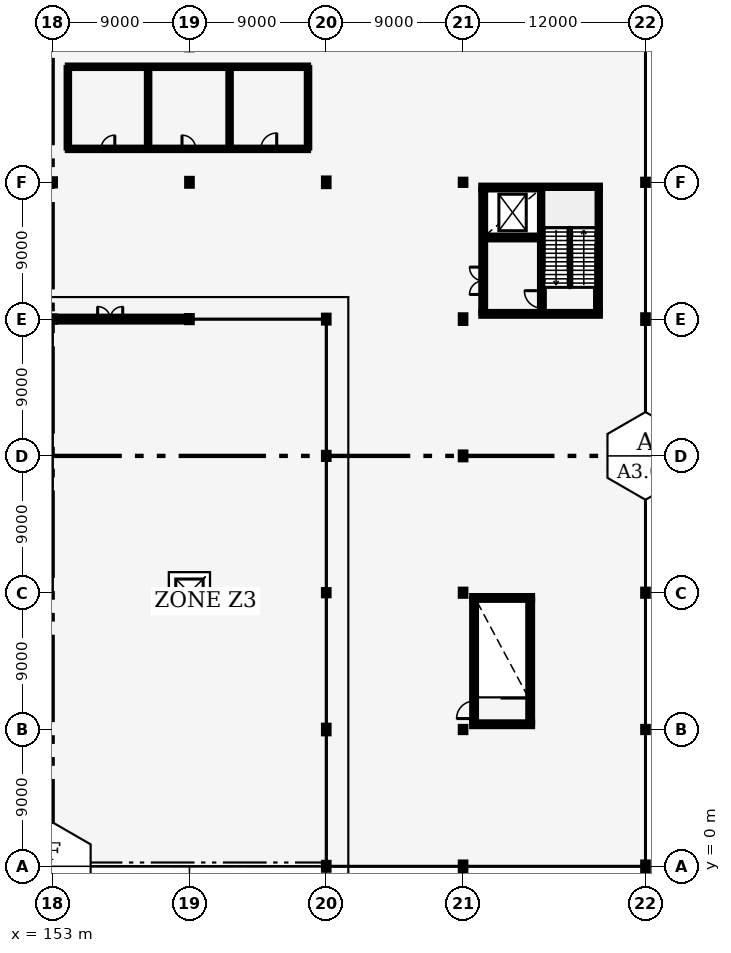
"""IFC4 building model, lengths in metres.
Left out: names, types, materials, properties, quantities, classifications, styles, units other than length and angle.
Written with IfcOpenShell. Run it as: python <this file> out.ifc"""

import sys

from ifc_helpers import new_model, si_unit, direction, frame, frame_2d, origin, origin_2d, place, context, subcontext, project, spatial, rectangle, i_section, extrude, element, fill, save


model = new_model("IFC4")
c1 = context("Model", 3, precision=1e-05, world=origin(), true_north=direction((0.0, 1.0)))
c2 = subcontext(c1, "Body", "Model", "MODEL_VIEW")
j1 = project(units=[si_unit("LENGTHUNIT", "METRE"), si_unit("PLANEANGLEUNIT", "RADIAN")], contexts=[c1])
p1 = place(None, origin())
s1 = spatial("IfcSite", under=j1, at=p1, CompositionType="ELEMENT")
p2 = place(p1, origin())
s2 = spatial("IfcBuilding", under=s1, at=p2, CompositionType="ELEMENT")
p3 = place(p2, frame((0.0, 0.0, 18.0)))
s3 = spatial("IfcBuildingStorey", under=s2, at=p3, CompositionType="ELEMENT", Elevation=18.0)
p4 = place(p3, frame((153.0, 36.0, 0.0), z_axis=(0.0, 0.0, 1.0), x_axis=(1.0, 0.0, 0.0)))
e1 = element("IfcColumn", 1, at=p4, inside=s3, PredefinedType="COLUMN", context=c2, shape_type="SweptSolid", body=[
    extrude(i_section(OverallWidth=0.3, OverallDepth=0.34, WebThickness=0.012, FlangeThickness=0.021, FilletRadius=0.027, at=origin_2d()), origin(), (0.0, 0.0, 1.0), 4.8),
])
for number, where, z_axis, x_axis in (
    (2, (153.0, 45.0, 0.0), (0.0, 0.0, 1.0), (1.0, 0.0, 0.0)),
    (3, (162.0, 36.0, 0.0), (0.0, 0.0, 1.0), (1.0, 0.0, 0.0)),
):
    element("IfcColumn", number, at=place(p3, frame(where, z_axis=z_axis, x_axis=x_axis)), inside=s3, PredefinedType="COLUMN", context=c2, shape_type="SweptSolid", body=[
        extrude(i_section(OverallWidth=0.3, OverallDepth=0.4, WebThickness=0.013, FlangeThickness=0.024, FilletRadius=0.027, at=origin_2d()), origin(), (0.0, 0.0, 1.0), 4.8),
    ])
for number, where, z_axis, x_axis in (
    (4, (162.0, 45.0, 0.0), (0.0, 0.0, 1.0), (1.0, 0.0, 0.0)),
    (5, (171.0, 0.0, 0.0), (0.0, 0.0, 1.0), (1.0, 0.0, 0.0)),
):
    element("IfcColumn", number, at=place(p3, frame(where, z_axis=z_axis, x_axis=x_axis)), inside=s3, PredefinedType="COLUMN", context=c2, shape_type="SweptSolid", body=[
        extrude(i_section(OverallWidth=0.3, OverallDepth=0.45, WebThickness=0.014, FlangeThickness=0.026, FilletRadius=0.027, at=origin_2d()), origin(), (0.0, 0.0, 1.0), 4.8),
    ])
p5 = place(p3, frame((171.0, 9.0, 0.0), z_axis=(0.0, 0.0, 1.0), x_axis=(1.0, 0.0, 0.0)))
e6 = element("IfcColumn", 6, at=p5, inside=s3, PredefinedType="COLUMN", context=c2, shape_type="SweptSolid", body=[
    extrude(i_section(OverallWidth=0.3, OverallDepth=0.5, WebThickness=0.014, FlangeThickness=0.028, FilletRadius=0.027, at=origin_2d()), origin(), (0.0, 0.0, 1.0), 4.8),
])
p6 = place(p3, frame((171.0, 18.0, 0.0), z_axis=(0.0, 0.0, 1.0), x_axis=(1.0, 0.0, 0.0)))
e7 = element("IfcColumn", 7, at=p6, inside=s3, PredefinedType="COLUMN", context=c2, shape_type="SweptSolid", body=[
    extrude(i_section(OverallWidth=0.3, OverallDepth=0.34, WebThickness=0.012, FlangeThickness=0.021, FilletRadius=0.027, at=origin_2d()), origin(), (0.0, 0.0, 1.0), 4.8),
])
p7 = place(p3, frame((171.0, 27.0, 0.0), z_axis=(0.0, 0.0, 1.0), x_axis=(1.0, 0.0, 0.0)))
e8 = element("IfcColumn", 8, at=p7, inside=s3, PredefinedType="COLUMN", context=c2, shape_type="SweptSolid", body=[
    extrude(i_section(OverallWidth=0.3, OverallDepth=0.4, WebThickness=0.013, FlangeThickness=0.024, FilletRadius=0.027, at=origin_2d()), origin(), (0.0, 0.0, 1.0), 4.8),
])
p8 = place(p3, frame((171.0, 36.0, 0.0), z_axis=(0.0, 0.0, 1.0), x_axis=(1.0, 0.0, 0.0)))
e9 = element("IfcColumn", 9, at=p8, inside=s3, PredefinedType="COLUMN", context=c2, shape_type="SweptSolid", body=[
    extrude(i_section(OverallWidth=0.3, OverallDepth=0.45, WebThickness=0.014, FlangeThickness=0.026, FilletRadius=0.027, at=origin_2d()), origin(), (0.0, 0.0, 1.0), 4.8),
])
for number, where, z_axis, x_axis in (
    (10, (171.0, 45.0, 0.0), (0.0, 0.0, 1.0), (1.0, 0.0, 0.0)),
    (11, (180.0, 0.0, 0.0), (0.0, 0.0, 1.0), (1.0, 0.0, 0.0)),
):
    element("IfcColumn", number, at=place(p3, frame(where, z_axis=z_axis, x_axis=x_axis)), inside=s3, PredefinedType="COLUMN", context=c2, shape_type="SweptSolid", body=[
        extrude(i_section(OverallWidth=0.3, OverallDepth=0.5, WebThickness=0.014, FlangeThickness=0.028, FilletRadius=0.027, at=origin_2d()), origin(), (0.0, 0.0, 1.0), 4.8),
    ])
p9 = place(p3, frame((180.0, 9.0, 0.0), z_axis=(0.0, 0.0, 1.0), x_axis=(1.0, 0.0, 0.0)))
e12 = element("IfcColumn", 12, at=p9, inside=s3, PredefinedType="COLUMN", context=c2, shape_type="SweptSolid", body=[
    extrude(i_section(OverallWidth=0.3, OverallDepth=0.34, WebThickness=0.012, FlangeThickness=0.021, FilletRadius=0.027, at=origin_2d()), origin(), (0.0, 0.0, 1.0), 4.8),
])
p10 = place(p3, frame((180.0, 18.0, 0.0), z_axis=(0.0, 0.0, 1.0), x_axis=(1.0, 0.0, 0.0)))
e13 = element("IfcColumn", 13, at=p10, inside=s3, PredefinedType="COLUMN", context=c2, shape_type="SweptSolid", body=[
    extrude(i_section(OverallWidth=0.3, OverallDepth=0.4, WebThickness=0.013, FlangeThickness=0.024, FilletRadius=0.027, at=origin_2d()), origin(), (0.0, 0.0, 1.0), 4.8),
])
p11 = place(p3, frame((180.0, 27.0, 0.0), z_axis=(0.0, 0.0, 1.0), x_axis=(1.0, 0.0, 0.0)))
e14 = element("IfcColumn", 14, at=p11, inside=s3, PredefinedType="COLUMN", context=c2, shape_type="SweptSolid", body=[
    extrude(i_section(OverallWidth=0.3, OverallDepth=0.45, WebThickness=0.014, FlangeThickness=0.026, FilletRadius=0.027, at=origin_2d()), origin(), (0.0, 0.0, 1.0), 4.8),
])
p12 = place(p3, frame((180.0, 36.0, 0.0), z_axis=(0.0, 0.0, 1.0), x_axis=(1.0, 0.0, 0.0)))
e15 = element("IfcColumn", 15, at=p12, inside=s3, PredefinedType="COLUMN", context=c2, shape_type="SweptSolid", body=[
    extrude(i_section(OverallWidth=0.3, OverallDepth=0.5, WebThickness=0.014, FlangeThickness=0.028, FilletRadius=0.027, at=origin_2d()), origin(), (0.0, 0.0, 1.0), 4.8),
])
p13 = place(p3, frame((180.0, 45.0, 0.0), z_axis=(0.0, 0.0, 1.0), x_axis=(1.0, 0.0, 0.0)))
e16 = element("IfcColumn", 16, at=p13, inside=s3, PredefinedType="COLUMN", context=c2, shape_type="SweptSolid", body=[
    extrude(i_section(OverallWidth=0.3, OverallDepth=0.34, WebThickness=0.012, FlangeThickness=0.021, FilletRadius=0.027, at=origin_2d()), origin(), (0.0, 0.0, 1.0), 4.8),
])
p14 = place(p3, frame((192.0, 0.0, 0.0), z_axis=(0.0, 0.0, 1.0), x_axis=(1.0, 0.0, 0.0)))
e17 = element("IfcColumn", 17, at=p14, inside=s3, PredefinedType="COLUMN", context=c2, shape_type="SweptSolid", body=[
    extrude(i_section(OverallWidth=0.3, OverallDepth=0.5, WebThickness=0.014, FlangeThickness=0.028, FilletRadius=0.027, at=origin_2d()), origin(), (0.0, 0.0, 1.0), 4.8),
])
p15 = place(p3, frame((192.0, 9.0, 0.0), z_axis=(0.0, 0.0, 1.0), x_axis=(1.0, 0.0, 0.0)))
e18 = element("IfcColumn", 18, at=p15, inside=s3, PredefinedType="COLUMN", context=c2, shape_type="SweptSolid", body=[
    extrude(i_section(OverallWidth=0.3, OverallDepth=0.34, WebThickness=0.012, FlangeThickness=0.021, FilletRadius=0.027, at=origin_2d()), origin(), (0.0, 0.0, 1.0), 4.8),
])
p16 = place(p3, frame((192.0, 18.0, 0.0), z_axis=(0.0, 0.0, 1.0), x_axis=(1.0, 0.0, 0.0)))
e19 = element("IfcColumn", 19, at=p16, inside=s3, PredefinedType="COLUMN", context=c2, shape_type="SweptSolid", body=[
    extrude(i_section(OverallWidth=0.3, OverallDepth=0.4, WebThickness=0.013, FlangeThickness=0.024, FilletRadius=0.027, at=origin_2d()), origin(), (0.0, 0.0, 1.0), 4.8),
])
p17 = place(p3, frame((192.0, 27.0, 0.0), z_axis=(0.0, 0.0, 1.0), x_axis=(1.0, 0.0, 0.0)))
e20 = element("IfcColumn", 20, at=p17, inside=s3, PredefinedType="COLUMN", context=c2, shape_type="SweptSolid", body=[
    extrude(i_section(OverallWidth=0.3, OverallDepth=0.45, WebThickness=0.014, FlangeThickness=0.026, FilletRadius=0.027, at=origin_2d()), origin(), (0.0, 0.0, 1.0), 4.8),
])
p18 = place(p3, frame((192.0, 36.0, 0.0), z_axis=(0.0, 0.0, 1.0), x_axis=(1.0, 0.0, 0.0)))
e21 = element("IfcColumn", 21, at=p18, inside=s3, PredefinedType="COLUMN", context=c2, shape_type="SweptSolid", body=[
    extrude(i_section(OverallWidth=0.3, OverallDepth=0.5, WebThickness=0.014, FlangeThickness=0.028, FilletRadius=0.027, at=origin_2d()), origin(), (0.0, 0.0, 1.0), 4.8),
])
p19 = place(p3, frame((192.0, 45.0, 0.0), z_axis=(0.0, 0.0, 1.0), x_axis=(1.0, 0.0, 0.0)))
e22 = element("IfcColumn", 22, at=p19, inside=s3, PredefinedType="COLUMN", context=c2, shape_type="SweptSolid", body=[
    extrude(i_section(OverallWidth=0.3, OverallDepth=0.34, WebThickness=0.012, FlangeThickness=0.021, FilletRadius=0.027, at=origin_2d()), origin(), (0.0, 0.0, 1.0), 4.8),
])
p20 = place(p3, frame((153.145, 36.0, 0.0), z_axis=(0.0, 0.0, 1.0), x_axis=(1.0, 0.0, 0.0)))
e23 = element("IfcWall", 23, at=p20, inside=s3, PredefinedType="SOLIDWALL", context=c2, shape_type="SweptSolid", body=[
    extrude(rectangle(XDim=8.71, YDim=0.32, at=frame_2d((4.355, 0.0))), origin(), (0.0, 0.0, 1.0), 3.65),
])
p21 = place(p20, frame((2.815, 0.0, 0.0)))
e24 = element("IfcOpeningElement", 24, at=p21, cuts=e23, PredefinedType="OPENING", context=c2, shape_type="SweptSolid", body=[
    extrude(rectangle(XDim=1.65, YDim=2.25, at=frame_2d((0.825, 1.125))), frame((0.0, 0.17, 0.0), z_axis=(0.0, -1.0, 0.0), x_axis=(1.0, 0.0, 0.0)), (0.0, 0.0, 1.0), 0.34),
])
p22 = place(p20, frame((5.415, 0.0, 0.85)))
e25 = element("IfcOpeningElement", 25, at=p22, cuts=e23, PredefinedType="OPENING", context=c2, shape_type="SweptSolid", body=[
    extrude(rectangle(XDim=2.4, YDim=1.6, at=frame_2d((1.2, 0.8))), frame((0.0, 0.17, 0.0), z_axis=(0.0, -1.0, 0.0), x_axis=(1.0, 0.0, 0.0)), (0.0, 0.0, 1.0), 0.34),
])
p23 = place(p3, frame((181.325, 36.47, 0.0), z_axis=(0.0, 0.0, 1.0), x_axis=(0.0, 1.0, 0.0)))
e26 = element("IfcWall", 26, at=p23, inside=s3, PredefinedType="SHEAR", context=c2, shape_type="SweptSolid", body=[
    extrude(rectangle(XDim=8.06, YDim=0.25, at=frame_2d((4.03, 0.0))), origin(), (0.0, 0.0, 1.0), 4.45),
])
p24 = place(p23, frame((1.15, 0.0, 0.0)))
e27 = element("IfcOpeningElement", 27, at=p24, cuts=e26, PredefinedType="OPENING", context=c2, shape_type="SweptSolid", body=[
    extrude(rectangle(XDim=1.8, YDim=2.2, at=frame_2d((0.9, 1.1))), frame((0.0, 0.135, 0.0), z_axis=(0.0, -1.0, 0.0), x_axis=(1.0, 0.0, 0.0)), (0.0, 0.0, 1.0), 0.27),
])
p25 = place(p3, frame((188.875, 36.47, 0.0), z_axis=(0.0, 0.0, 1.0), x_axis=(0.0, 1.0, 0.0)))
e28 = element("IfcWall", 28, at=p25, inside=s3, PredefinedType="SHEAR", context=c2, shape_type="SweptSolid", body=[
    extrude(rectangle(XDim=8.06, YDim=0.25, at=frame_2d((4.03, 0.0))), origin(), (0.0, 0.0, 1.0), 4.45),
])
for number, where, z_axis, x_axis in (
    (29, (181.2, 36.345, 0.0), (0.0, 0.0, 1.0), (1.0, 0.0, 0.0)),
    (30, (181.2, 44.655, 0.0), (0.0, 0.0, 1.0), (1.0, 0.0, 0.0)),
):
    element("IfcWall", number, at=place(p3, frame(where, z_axis=z_axis, x_axis=x_axis)), inside=s3, PredefinedType="SHEAR", context=c2, shape_type="SweptSolid", body=[
        extrude(rectangle(XDim=7.8, YDim=0.25, at=frame_2d((3.9, 0.0))), origin(), (0.0, 0.0, 1.0), 4.45),
    ])
p26 = place(p3, frame((185.185, 36.47, 0.0), z_axis=(0.0, 0.0, 1.0), x_axis=(0.0, 1.0, 0.0)))
e31 = element("IfcWall", 31, at=p26, inside=s3, PredefinedType="SHEAR", context=c2, shape_type="SweptSolid", body=[
    extrude(rectangle(XDim=8.06, YDim=0.25, at=frame_2d((4.03, 0.0))), origin(), (0.0, 0.0, 1.0), 4.45),
])
p27 = place(p26, frame((0.25, 0.0, 0.0)))
e32 = element("IfcOpeningElement", 32, at=p27, cuts=e31, PredefinedType="OPENING", context=c2, shape_type="SweptSolid", body=[
    extrude(rectangle(XDim=1.15, YDim=2.15, at=frame_2d((0.575, 1.075))), frame((0.0, 0.135, 0.0), z_axis=(0.0, -1.0, 0.0), x_axis=(1.0, 0.0, 0.0)), (0.0, 0.0, 1.0), 0.27),
])
p28 = place(p3, frame((181.45, 41.37, 0.0), z_axis=(0.0, 0.0, 1.0), x_axis=(1.0, 0.0, 0.0)))
e33 = element("IfcWall", 33, at=p28, inside=s3, PredefinedType="SHEAR", context=c2, shape_type="SweptSolid", body=[
    extrude(rectangle(XDim=3.61, YDim=0.25, at=frame_2d((1.805, 0.0))), origin(), (0.0, 0.0, 1.0), 4.45),
])
p29 = place(p28, frame((0.95, 0.0, 0.0)))
e34 = element("IfcOpeningElement", 34, at=p29, cuts=e33, PredefinedType="OPENING", context=c2, shape_type="SweptSolid", body=[
    extrude(rectangle(XDim=1.2, YDim=2.2, at=frame_2d((0.6, 1.1))), frame((0.0, 0.135, 0.0), z_axis=(0.0, -1.0, 0.0), x_axis=(1.0, 0.0, 0.0)), (0.0, 0.0, 1.0), 0.27),
])
p30 = place(p3, frame((180.725, 9.47, 0.0), z_axis=(0.0, 0.0, 1.0), x_axis=(0.0, 1.0, 0.0)))
e35 = element("IfcWall", 35, at=p30, inside=s3, PredefinedType="SHEAR", context=c2, shape_type="SweptSolid", body=[
    extrude(rectangle(XDim=8.06, YDim=0.25, at=frame_2d((4.03, 0.0))), origin(), (0.0, 0.0, 1.0), 4.44),
])
p31 = place(p30, frame((0.25, 0.0, 0.0)))
e36 = element("IfcOpeningElement", 36, at=p31, cuts=e35, PredefinedType="OPENING", context=c2, shape_type="SweptSolid", body=[
    extrude(rectangle(XDim=1.15, YDim=2.15, at=frame_2d((0.575, 1.075))), frame((0.0, 0.135, 0.0), z_axis=(0.0, -1.0, 0.0), x_axis=(1.0, 0.0, 0.0)), (0.0, 0.0, 1.0), 0.27),
])
p32 = place(p3, frame((184.415, 9.47, 0.0), z_axis=(0.0, 0.0, 1.0), x_axis=(0.0, 1.0, 0.0)))
e37 = element("IfcWall", 37, at=p32, inside=s3, PredefinedType="SHEAR", context=c2, shape_type="SweptSolid", body=[
    extrude(rectangle(XDim=8.06, YDim=0.25, at=frame_2d((4.03, 0.0))), origin(), (0.0, 0.0, 1.0), 4.44),
])
for number, where, z_axis, x_axis in (
    (38, (180.6, 9.345, 0.0), (0.0, 0.0, 1.0), (1.0, 0.0, 0.0)),
    (39, (180.6, 17.655, 0.0), (0.0, 0.0, 1.0), (1.0, 0.0, 0.0)),
):
    element("IfcWall", number, at=place(p3, frame(where, z_axis=z_axis, x_axis=x_axis)), inside=s3, PredefinedType="SHEAR", context=c2, shape_type="SweptSolid", body=[
        extrude(rectangle(XDim=3.94, YDim=0.25, at=frame_2d((1.97, 0.0))), origin(), (0.0, 0.0, 1.0), 4.44),
    ])
p33 = place(p3, frame((154.0, 47.2, 0.0), z_axis=(0.0, 0.0, 1.0), x_axis=(1.0, 0.0, 0.0)))
e40 = element("IfcWall", 40, at=p33, inside=s3, PredefinedType="PLUMBINGWALL", context=c2, shape_type="SweptSolid", body=[
    extrude(rectangle(XDim=15.8, YDim=0.16, at=frame_2d((7.9, 0.0))), origin(), (0.0, 0.0, 1.0), 3.6),
])
p34 = place(p33, frame((2.19, 0.0, 0.0)))
e41 = element("IfcOpeningElement", 41, at=p34, cuts=e40, PredefinedType="OPENING", context=c2, shape_type="SweptSolid", body=[
    extrude(rectangle(XDim=0.9, YDim=2.1, at=frame_2d((0.45, 1.05))), frame((0.0, 0.09, 0.0), z_axis=(0.0, -1.0, 0.0), x_axis=(1.0, 0.0, 0.0)), (0.0, 0.0, 1.0), 0.18),
])
p35 = place(p33, frame((7.51, 0.0, 0.0)))
e42 = element("IfcOpeningElement", 42, at=p35, cuts=e40, PredefinedType="OPENING", context=c2, shape_type="SweptSolid", body=[
    extrude(rectangle(XDim=0.9, YDim=2.1, at=frame_2d((0.45, 1.05))), frame((0.0, 0.09, 0.0), z_axis=(0.0, -1.0, 0.0), x_axis=(1.0, 0.0, 0.0)), (0.0, 0.0, 1.0), 0.18),
])
p36 = place(p33, frame((12.7, 0.0, 0.0)))
e43 = element("IfcOpeningElement", 43, at=p36, cuts=e40, PredefinedType="OPENING", context=c2, shape_type="SweptSolid", body=[
    extrude(rectangle(XDim=1.04, YDim=2.15, at=frame_2d((0.52, 1.075))), frame((0.0, 0.09, 0.0), z_axis=(0.0, -1.0, 0.0), x_axis=(1.0, 0.0, 0.0)), (0.0, 0.0, 1.0), 0.18),
])
p37 = place(p3, frame((154.0, 52.6, 0.0), z_axis=(0.0, 0.0, 1.0), x_axis=(1.0, 0.0, 0.0)))
e44 = element("IfcWall", 44, at=p37, inside=s3, PredefinedType="PLUMBINGWALL", context=c2, shape_type="SweptSolid", body=[
    extrude(rectangle(XDim=15.8, YDim=0.16, at=frame_2d((7.9, 0.0))), origin(), (0.0, 0.0, 1.0), 3.6),
])
for number, where, z_axis, x_axis in (
    (45, (154.0, 47.288, 0.0), (0.0, 0.0, 1.0), (0.0, 1.0, 0.0)),
    (46, (159.28, 47.288, 0.0), (0.0, 0.0, 1.0), (0.0, 1.0, 0.0)),
    (47, (164.64, 47.288, 0.0), (0.0, 0.0, 1.0), (0.0, 1.0, 0.0)),
    (48, (169.8, 47.288, 0.0), (0.0, 0.0, 1.0), (0.0, 1.0, 0.0)),
):
    element("IfcWall", number, at=place(p3, frame(where, z_axis=z_axis, x_axis=x_axis)), inside=s3, PredefinedType="PLUMBINGWALL", context=c2, shape_type="SweptSolid", body=[
        extrude(rectangle(XDim=5.224, YDim=0.16, at=frame_2d((2.612, 0.0))), origin(), (0.0, 0.0, 1.0), 3.6),
    ])
p38 = place(p21, origin())
e49 = element("IfcDoor", 49, at=p38, inside=s3, OperationType="DOUBLE_DOOR_SINGLE_SWING", PredefinedType="DOOR", context=c2, shape_type="SweptSolid", body=[
    extrude(rectangle(XDim=1.65, YDim=2.25, at=frame_2d((0.825, 1.125))), frame((0.0, 0.025, 0.0), z_axis=(0.0, -1.0, 0.0), x_axis=(1.0, 0.0, 0.0)), (0.0, 0.0, 1.0), 0.05),
])
fill(e24, e49)
p39 = place(p22, origin())
e50 = element("IfcWindow", 50, at=p39, inside=s3, PartitioningType="SINGLE_PANEL", PredefinedType="WINDOW", context=c2, shape_type="SweptSolid", body=[
    extrude(rectangle(XDim=2.4, YDim=1.6, at=frame_2d((1.2, 0.8))), frame((0.0, 0.03, 0.0), z_axis=(0.0, -1.0, 0.0), x_axis=(1.0, 0.0, 0.0)), (0.0, 0.0, 1.0), 0.06),
])
fill(e25, e50)
p40 = place(p3, frame((0.0, 0.0, -0.345)))
p41 = place(p40, frame((162.0, 18.0, 0.0)))
p42 = place(p41, frame((0.0, 0.0, 0.295)))
e51 = element("IfcWindow", 51, at=p42, inside=s3, PartitioningType="SINGLE_PANEL", PredefinedType="LIGHTDOME", context=c2, shape_type="SweptSolid", body=[
    extrude(rectangle(XDim=1.8, YDim=1.8, at=origin_2d()), origin(), (0.0, 0.0, 1.0), 0.05),
])
p43 = place(p27, origin())
e52 = element("IfcDoor", 52, at=p43, inside=s3, OperationType="SINGLE_SWING_RIGHT", PredefinedType="DOOR", context=c2, shape_type="SweptSolid", body=[
    extrude(rectangle(XDim=1.15, YDim=2.15, at=frame_2d((0.575, 1.075))), frame((0.0, 0.025, 0.0), z_axis=(0.0, -1.0, 0.0), x_axis=(1.0, 0.0, 0.0)), (0.0, 0.0, 1.0), 0.05),
])
fill(e32, e52)
p44 = place(p29, origin())
e53 = element("IfcDoor", 53, at=p44, inside=s3, OperationType="DOUBLE_DOOR_SLIDING", PredefinedType="DOOR", context=c2, shape_type="SweptSolid", body=[
    extrude(rectangle(XDim=1.2, YDim=2.2, at=frame_2d((0.6, 1.1))), frame((0.0, 0.025, 0.0), z_axis=(0.0, -1.0, 0.0), x_axis=(1.0, 0.0, 0.0)), (0.0, 0.0, 1.0), 0.05),
])
fill(e34, e53)
p45 = place(p24, origin())
e54 = element("IfcDoor", 54, at=p45, inside=s3, OperationType="DOUBLE_DOOR_SINGLE_SWING", PredefinedType="DOOR", context=c2, shape_type="SweptSolid", body=[
    extrude(rectangle(XDim=1.8, YDim=2.2, at=frame_2d((0.9, 1.1))), frame((0.0, 0.025, 0.0), z_axis=(0.0, -1.0, 0.0), x_axis=(1.0, 0.0, 0.0)), (0.0, 0.0, 1.0), 0.05),
])
fill(e27, e54)
p46 = place(p31, origin())
e55 = element("IfcDoor", 55, at=p46, inside=s3, OperationType="SINGLE_SWING_LEFT", PredefinedType="DOOR", context=c2, shape_type="SweptSolid", body=[
    extrude(rectangle(XDim=1.15, YDim=2.15, at=frame_2d((0.575, 1.075))), frame((0.0, 0.025, 0.0), z_axis=(0.0, -1.0, 0.0), x_axis=(1.0, 0.0, 0.0)), (0.0, 0.0, 1.0), 0.05),
])
fill(e36, e55)
p47 = place(p34, origin())
e56 = element("IfcDoor", 56, at=p47, inside=s3, OperationType="SINGLE_SWING_RIGHT", PredefinedType="DOOR", context=c2, shape_type="SweptSolid", body=[
    extrude(rectangle(XDim=0.9, YDim=2.1, at=frame_2d((0.45, 1.05))), frame((0.0, 0.025, 0.0), z_axis=(0.0, -1.0, 0.0), x_axis=(1.0, 0.0, 0.0)), (0.0, 0.0, 1.0), 0.05),
])
fill(e41, e56)
p48 = place(p35, origin())
e57 = element("IfcDoor", 57, at=p48, inside=s3, OperationType="SINGLE_SWING_LEFT", PredefinedType="DOOR", context=c2, shape_type="SweptSolid", body=[
    extrude(rectangle(XDim=0.9, YDim=2.1, at=frame_2d((0.45, 1.05))), frame((0.0, 0.025, 0.0), z_axis=(0.0, -1.0, 0.0), x_axis=(1.0, 0.0, 0.0)), (0.0, 0.0, 1.0), 0.05),
])
fill(e42, e57)
p49 = place(p36, origin())
e58 = element("IfcDoor", 58, at=p49, inside=s3, OperationType="SINGLE_SWING_RIGHT", PredefinedType="DOOR", context=c2, shape_type="SweptSolid", body=[
    extrude(rectangle(XDim=1.04, YDim=2.15, at=frame_2d((0.52, 1.075))), frame((0.0, 0.025, 0.0), z_axis=(0.0, -1.0, 0.0), x_axis=(1.0, 0.0, 0.0)), (0.0, 0.0, 1.0), 0.05),
])
fill(e43, e58)
save(model, sys.argv[1])
